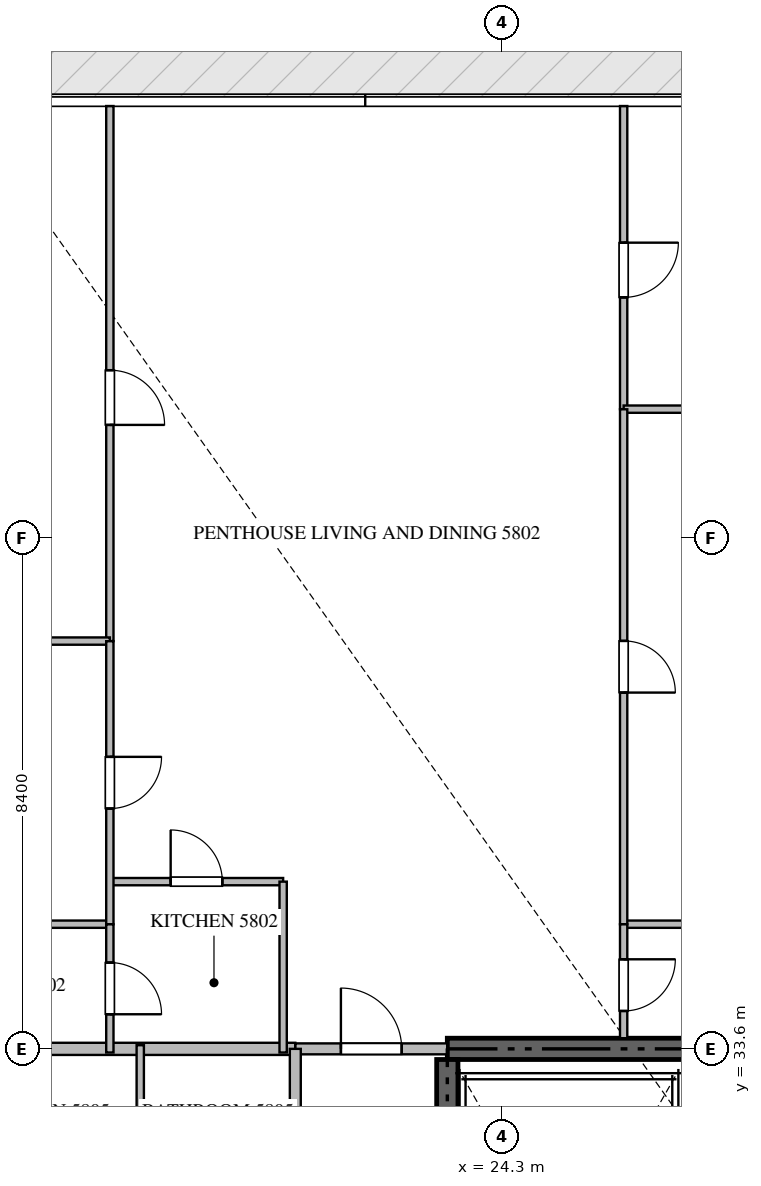
"""IFC4 building model, lengths in metres.
Left out: names, types, materials, properties, quantities, classifications, styles, units other than length and angle.
Written with IfcOpenShell. Run it as: python <this file> out.ifc"""

import sys

from ifc_helpers import new_model, si_unit, direction, frame, frame_2d, origin, place, context, subcontext, project, spatial, rectangle, extrude, source, transform, mapped, element, fill, save


model = new_model("IFC4")
c1 = context("Model", 3, precision=1e-05, world=origin(), true_north=direction((0.0, 1.0)))
c2 = subcontext(c1, "Body", "Model", "MODEL_VIEW")
j1 = project(units=[si_unit("LENGTHUNIT", "METRE"), si_unit("PLANEANGLEUNIT", "RADIAN")], contexts=[c1])
p1 = place(None, origin())
s1 = spatial("IfcSite", under=j1, at=p1, CompositionType="ELEMENT")
p2 = place(p1, origin())
s2 = spatial("IfcBuilding", under=s1, at=p2, CompositionType="ELEMENT")
p3 = place(p2, frame((0.0, 0.0, 233.55)))
s3 = spatial("IfcBuildingStorey", under=s2, at=p3, CompositionType="ELEMENT", Elevation=233.55)
p4 = place(p3, frame((41.4, 33.6, -0.26), z_axis=(0.0, 0.0, 1.0), x_axis=(-1.0, 0.0, 0.0)))
e1 = element("IfcWall", 1, at=p4, inside=s3, PredefinedType="SHEAR", context=c2, shape_type="SweptSolid", body=[
    extrude(rectangle(XDim=18.0, YDim=0.35, at=frame_2d((9.0, 0.0))), origin(), (0.0, 0.0, 1.0), 3.848),
])
p5 = place(p3, frame((23.4, 24.25, -0.26), z_axis=(0.0, 0.0, 1.0), x_axis=(0.0, 1.0, 0.0)))
e2 = element("IfcWall", 2, at=p5, inside=s3, PredefinedType="SHEAR", context=c2, shape_type="SweptSolid", body=[
    extrude(rectangle(XDim=9.175, YDim=0.35, at=frame_2d((4.587, 0.0))), origin(), (0.0, 0.0, 1.0), 3.848),
])
p6 = place(p3, frame((7.482, 33.6, 0.0), z_axis=(0.0, 0.0, 1.0), x_axis=(1.0, 0.0, 0.0)))
e3 = element("IfcWall", 3, at=p6, inside=s3, PredefinedType="PARTITIONING", context=c2, shape_type="SweptSolid", body=[
    extrude(rectangle(XDim=13.418, YDim=0.2, at=frame_2d((6.709, 0.0))), origin(), (0.0, 0.0, 1.0), 3.59),
])
p7 = place(p3, frame((20.902, 33.6, 0.0), z_axis=(0.0, 0.0, 1.0), x_axis=(1.0, 0.0, 0.0)))
e4 = element("IfcWall", 4, at=p7, inside=s3, PredefinedType="PARTITIONING", context=c2, shape_type="SweptSolid", body=[
    extrude(rectangle(XDim=2.496, YDim=0.18, at=frame_2d((1.248, 0.0))), origin(), (0.0, 0.0, 1.0), 3.59),
])
p8 = place(p7, frame((0.748, 0.0, 0.0)))
e5 = element("IfcOpeningElement", 5, at=p8, cuts=e4, PredefinedType="OPENING", context=c2, shape_type="SweptSolid", body=[
    extrude(rectangle(XDim=1.0, YDim=2.15, at=frame_2d((0.5, 1.075))), frame((0.0, 0.1, 0.0), z_axis=(0.0, -1.0, 0.0), x_axis=(1.0, 0.0, 0.0)), (0.0, 0.0, 1.0), 0.2),
])
p9 = place(p3, frame((20.9, 16.8, 0.0), z_axis=(0.0, 0.0, 1.0), x_axis=(0.0, 1.0, 0.0)))
e6 = element("IfcWall", 6, at=p9, inside=s3, PredefinedType="PARTITIONING", context=c2, shape_type="SweptSolid", body=[
    extrude(rectangle(XDim=16.8, YDim=0.18, at=frame_2d((8.4, 0.0))), origin(), (0.0, 0.0, 1.0), 3.59),
])
p10 = place(p9, frame((2.67, 0.0, 0.0)))
e7 = element("IfcOpeningElement", 7, at=p10, cuts=e6, PredefinedType="OPENING", context=c2, shape_type="SweptSolid", body=[
    extrude(rectangle(XDim=1.0, YDim=2.15, at=frame_2d((0.5, 1.075))), frame((0.0, 0.1, 0.0), z_axis=(0.0, -1.0, 0.0), x_axis=(1.0, 0.0, 0.0)), (0.0, 0.0, 1.0), 0.2),
])
p11 = place(p9, frame((11.107, 0.0, 0.0)))
e8 = element("IfcOpeningElement", 8, at=p11, cuts=e6, PredefinedType="OPENING", context=c2, shape_type="SweptSolid", body=[
    extrude(rectangle(XDim=1.0, YDim=2.15, at=frame_2d((0.5, 1.075))), frame((0.0, 0.1, 0.0), z_axis=(0.0, -1.0, 0.0), x_axis=(1.0, 0.0, 0.0)), (0.0, 0.0, 1.0), 0.2),
])
p12 = place(p3, frame((17.85, 36.35, 0.0), z_axis=(0.0, 0.0, 1.0), x_axis=(1.0, 0.0, 0.0)))
e9 = element("IfcWall", 9, at=p12, inside=s3, PredefinedType="PARTITIONING", context=c2, shape_type="SweptSolid", body=[
    extrude(rectangle(XDim=2.85, YDim=0.12, at=frame_2d((1.425, 0.0))), origin(), (0.0, 0.0, 1.0), 3.59),
])
p13 = place(p12, frame((1.0, 0.0, 0.0)))
e10 = element("IfcOpeningElement", 10, at=p13, cuts=e9, PredefinedType="OPENING", context=c2, shape_type="SweptSolid", body=[
    extrude(rectangle(XDim=0.85, YDim=2.1, at=frame_2d((0.425, 1.05))), frame((0.0, 0.07, 0.0), z_axis=(0.0, -1.0, 0.0), x_axis=(1.0, 0.0, 0.0)), (0.0, 0.0, 1.0), 0.14),
])
p14 = place(p3, frame((20.7, 36.35, 0.0), z_axis=(0.0, 0.0, 1.0), x_axis=(0.0, -1.0, 0.0)))
e11 = element("IfcWall", 11, at=p14, inside=s3, PredefinedType="PARTITIONING", context=c2, shape_type="SweptSolid", body=[
    extrude(rectangle(XDim=2.81, YDim=0.12, at=frame_2d((1.405, 0.0))), origin(), (0.0, 0.0, 1.0), 3.59),
])
p15 = place(p3, frame((17.85, 49.105, 0.0), z_axis=(0.0, 0.0, 1.0), x_axis=(0.0, -1.0, 0.0)))
e12 = element("IfcWall", 12, at=p15, inside=s3, PredefinedType="PARTITIONING", context=c2, shape_type="SweptSolid", body=[
    extrude(rectangle(XDim=8.799, YDim=0.12, at=frame_2d((4.399, 0.0))), origin(), (0.0, 0.0, 1.0), 3.59),
])
p16 = place(p15, frame((4.344, 0.0, 0.0)))
e13 = element("IfcOpeningElement", 13, at=p16, cuts=e12, PredefinedType="OPENING", context=c2, shape_type="SweptSolid", body=[
    extrude(rectangle(XDim=0.9, YDim=2.1, at=frame_2d((0.45, 1.05))), frame((0.0, 0.07, 0.0), z_axis=(0.0, -1.0, 0.0), x_axis=(1.0, 0.0, 0.0)), (0.0, 0.0, 1.0), 0.14),
])
p17 = place(p3, frame((7.495, 40.306, 0.0), z_axis=(0.0, 0.0, 1.0), x_axis=(1.0, 0.0, 0.0)))
e14 = element("IfcWall", 14, at=p17, inside=s3, PredefinedType="PARTITIONING", context=c2, shape_type="SweptSolid", body=[
    extrude(rectangle(XDim=10.355, YDim=0.12, at=frame_2d((5.177, 0.0))), origin(), (0.0, 0.0, 1.0), 3.122),
])
p18 = place(p3, frame((14.65, 35.65, 0.0), z_axis=(0.0, 0.0, 1.0), x_axis=(1.0, 0.0, 0.0)))
e15 = element("IfcWall", 15, at=p18, inside=s3, PredefinedType="PARTITIONING", context=c2, shape_type="SweptSolid", body=[
    extrude(rectangle(XDim=3.2, YDim=0.12, at=frame_2d((1.6, 0.0))), origin(), (0.0, 0.0, 1.0), 3.59),
])
p19 = place(p3, frame((17.85, 40.304, 0.0), z_axis=(0.0, 0.0, 1.0), x_axis=(0.0, -1.0, 0.0)))
e16 = element("IfcWall", 16, at=p19, inside=s3, PredefinedType="PARTITIONING", context=c2, shape_type="SweptSolid", body=[
    extrude(rectangle(XDim=4.654, YDim=0.12, at=frame_2d((2.327, 0.0))), origin(), (0.0, 0.0, 1.0), 3.59),
])
p20 = place(p19, frame((1.902, 0.0, 0.0)))
e17 = element("IfcOpeningElement", 17, at=p20, cuts=e16, PredefinedType="OPENING", context=c2, shape_type="SweptSolid", body=[
    extrude(rectangle(XDim=0.85, YDim=2.1, at=frame_2d((0.425, 1.05))), frame((0.0, 0.07, 0.0), z_axis=(0.0, -1.0, 0.0), x_axis=(1.0, 0.0, 0.0)), (0.0, 0.0, 1.0), 0.14),
])
p21 = place(p3, frame((17.85, 35.648, 0.0), z_axis=(0.0, 0.0, 1.0), x_axis=(0.0, -1.0, 0.0)))
e18 = element("IfcWall", 18, at=p21, inside=s3, PredefinedType="PARTITIONING", context=c2, shape_type="SweptSolid", body=[
    extrude(rectangle(XDim=2.108, YDim=0.12, at=frame_2d((1.054, 0.0))), origin(), (0.0, 0.0, 1.0), 3.59),
])
p22 = place(p21, frame((0.629, 0.0, 0.0)))
e19 = element("IfcOpeningElement", 19, at=p22, cuts=e18, PredefinedType="OPENING", context=c2, shape_type="SweptSolid", body=[
    extrude(rectangle(XDim=0.85, YDim=2.1, at=frame_2d((0.425, 1.05))), frame((0.0, 0.07, 0.0), z_axis=(0.0, -1.0, 0.0), x_axis=(1.0, 0.0, 0.0)), (0.0, 0.0, 1.0), 0.14),
])
p23 = place(p3, frame((26.3, 49.105, 0.0), z_axis=(0.0, 0.0, 1.0), x_axis=(0.0, -1.0, 0.0)))
e20 = element("IfcWall", 20, at=p23, inside=s3, PredefinedType="PARTITIONING", context=c2, shape_type="SweptSolid", body=[
    extrude(rectangle(XDim=4.985, YDim=0.12, at=frame_2d((2.492, 0.0))), origin(), (0.0, 0.0, 1.0), 3.59),
])
p24 = place(p23, frame((2.247, 0.0, 0.0)))
e21 = element("IfcOpeningElement", 21, at=p24, cuts=e20, PredefinedType="OPENING", context=c2, shape_type="SweptSolid", body=[
    extrude(rectangle(XDim=0.9, YDim=2.1, at=frame_2d((0.45, 1.05))), frame((0.0, 0.07, 0.0), z_axis=(0.0, -1.0, 0.0), x_axis=(1.0, 0.0, 0.0)), (0.0, 0.0, 1.0), 0.14),
])
for number, where, z_axis, x_axis in (
    (22, (26.3, 44.12, 0.0), (0.0, 0.0, 1.0), (1.0, 0.0, 0.0)),
    (23, (26.3, 35.65, 0.0), (0.0, 0.0, 1.0), (1.0, 0.0, 0.0)),
):
    element("IfcWall", number, at=place(p3, frame(where, z_axis=z_axis, x_axis=x_axis)), inside=s3, PredefinedType="PARTITIONING", context=c2, shape_type="SweptSolid", body=[
        extrude(rectangle(XDim=6.16, YDim=0.12, at=frame_2d((3.08, 0.0))), origin(), (0.0, 0.0, 1.0), 3.59),
    ])
p25 = place(p3, frame((26.3, 44.118, 0.0), z_axis=(0.0, 0.0, 1.0), x_axis=(0.0, -1.0, 0.0)))
e24 = element("IfcWall", 24, at=p25, inside=s3, PredefinedType="PARTITIONING", context=c2, shape_type="SweptSolid", body=[
    extrude(rectangle(XDim=8.468, YDim=0.12, at=frame_2d((4.234, 0.0))), origin(), (0.0, 0.0, 1.0), 3.59),
])
p26 = place(p25, frame((3.809, 0.0, 0.0)))
e25 = element("IfcOpeningElement", 25, at=p26, cuts=e24, PredefinedType="OPENING", context=c2, shape_type="SweptSolid", body=[
    extrude(rectangle(XDim=0.85, YDim=2.1, at=frame_2d((0.425, 1.05))), frame((0.0, 0.07, 0.0), z_axis=(0.0, -1.0, 0.0), x_axis=(1.0, 0.0, 0.0)), (0.0, 0.0, 1.0), 0.14),
])
p27 = place(p3, frame((26.3, 35.648, 0.0), z_axis=(0.0, 0.0, 1.0), x_axis=(0.0, -1.0, 0.0)))
e26 = element("IfcWall", 26, at=p27, inside=s3, PredefinedType="PARTITIONING", context=c2, shape_type="SweptSolid", body=[
    extrude(rectangle(XDim=1.873, YDim=0.12, at=frame_2d((0.937, 0.0))), origin(), (0.0, 0.0, 1.0), 3.59),
])
p28 = place(p27, frame((0.575, 0.0, 0.0)))
e27 = element("IfcOpeningElement", 27, at=p28, cuts=e26, PredefinedType="OPENING", context=c2, shape_type="SweptSolid", body=[
    extrude(rectangle(XDim=0.85, YDim=2.1, at=frame_2d((0.425, 1.05))), frame((0.0, 0.07, 0.0), z_axis=(0.0, -1.0, 0.0), x_axis=(1.0, 0.0, 0.0)), (0.0, 0.0, 1.0), 0.14),
])
p29 = place(p3, frame((18.35, 31.0, 0.0), z_axis=(0.0, 0.0, 1.0), x_axis=(0.0, 1.0, 0.0)))
e28 = element("IfcWall", 28, at=p29, inside=s3, PredefinedType="PARTITIONING", context=c2, shape_type="SweptSolid", body=[
    extrude(rectangle(XDim=2.66, YDim=0.12, at=frame_2d((1.33, 0.0))), origin(), (0.0, 0.0, 1.0), 3.59),
])
m1 = source(origin(), c2, "Body", "SweptSolid", [
    extrude(rectangle(XDim=1.0, YDim=2.15, at=frame_2d((0.5, 1.075))), frame((0.0, 0.025, 0.0), z_axis=(0.0, -1.0, 0.0), x_axis=(1.0, 0.0, 0.0)), (0.0, 0.0, 1.0), 0.05),
])
p30 = place(p8, origin())
e29 = element("IfcDoor", 29, at=p30, inside=s3, OperationType="SINGLE_SWING_LEFT", PredefinedType="DOOR", context=c2, shape_type="MappedRepresentation", body=[
    mapped(m1, transform((0.0, 0.0, 0.0), scale=1.0)),
])
fill(e5, e29)
m2 = source(origin(), c2, "Body", "SweptSolid", [
    extrude(rectangle(XDim=0.85, YDim=2.1, at=frame_2d((0.425, 1.05))), frame((0.0, 0.025, 0.0), z_axis=(0.0, -1.0, 0.0), x_axis=(1.0, 0.0, 0.0)), (0.0, 0.0, 1.0), 0.05),
])
p31 = place(p13, origin())
e30 = element("IfcDoor", 30, at=p31, inside=s3, OperationType="SINGLE_SWING_LEFT", PredefinedType="DOOR", context=c2, shape_type="MappedRepresentation", body=[
    mapped(m2, transform((0.0, 0.0, 0.0), scale=1.0)),
])
fill(e10, e30)
m3 = source(origin(), c2, "Body", "SweptSolid", [
    extrude(rectangle(XDim=0.9, YDim=2.1, at=frame_2d((0.45, 1.05))), frame((0.0, 0.025, 0.0), z_axis=(0.0, -1.0, 0.0), x_axis=(1.0, 0.0, 0.0)), (0.0, 0.0, 1.0), 0.05),
])
p32 = place(p16, origin())
e31 = element("IfcDoor", 31, at=p32, inside=s3, OperationType="SINGLE_SWING_RIGHT", PredefinedType="DOOR", context=c2, shape_type="MappedRepresentation", body=[
    mapped(m3, transform((0.0, 0.0, 0.0), scale=1.0)),
])
fill(e13, e31)
p33 = place(p20, origin())
e32 = element("IfcDoor", 32, at=p33, inside=s3, OperationType="SINGLE_SWING_LEFT", PredefinedType="DOOR", context=c2, shape_type="MappedRepresentation", body=[
    mapped(m2, transform((0.0, 0.0, 0.0), scale=1.0)),
])
fill(e17, e32)
p34 = place(p22, origin())
e33 = element("IfcDoor", 33, at=p34, inside=s3, OperationType="SINGLE_SWING_RIGHT", PredefinedType="DOOR", context=c2, shape_type="MappedRepresentation", body=[
    mapped(m2, transform((0.0, 0.0, 0.0), scale=1.0)),
])
fill(e19, e33)
p35 = place(p24, origin())
e34 = element("IfcDoor", 34, at=p35, inside=s3, OperationType="SINGLE_SWING_LEFT", PredefinedType="DOOR", context=c2, shape_type="MappedRepresentation", body=[
    mapped(m3, transform((0.0, 0.0, 0.0), scale=1.0)),
])
fill(e21, e34)
p36 = place(p26, origin())
e35 = element("IfcDoor", 35, at=p36, inside=s3, OperationType="SINGLE_SWING_RIGHT", PredefinedType="DOOR", context=c2, shape_type="MappedRepresentation", body=[
    mapped(m2, transform((0.0, 0.0, 0.0), scale=1.0)),
])
fill(e25, e35)
p37 = place(p28, origin())
e36 = element("IfcDoor", 36, at=p37, inside=s3, OperationType="SINGLE_SWING_LEFT", PredefinedType="DOOR", context=c2, shape_type="MappedRepresentation", body=[
    mapped(m2, transform((0.0, 0.0, 0.0), scale=1.0)),
])
fill(e27, e36)
save(model, sys.argv[1])
